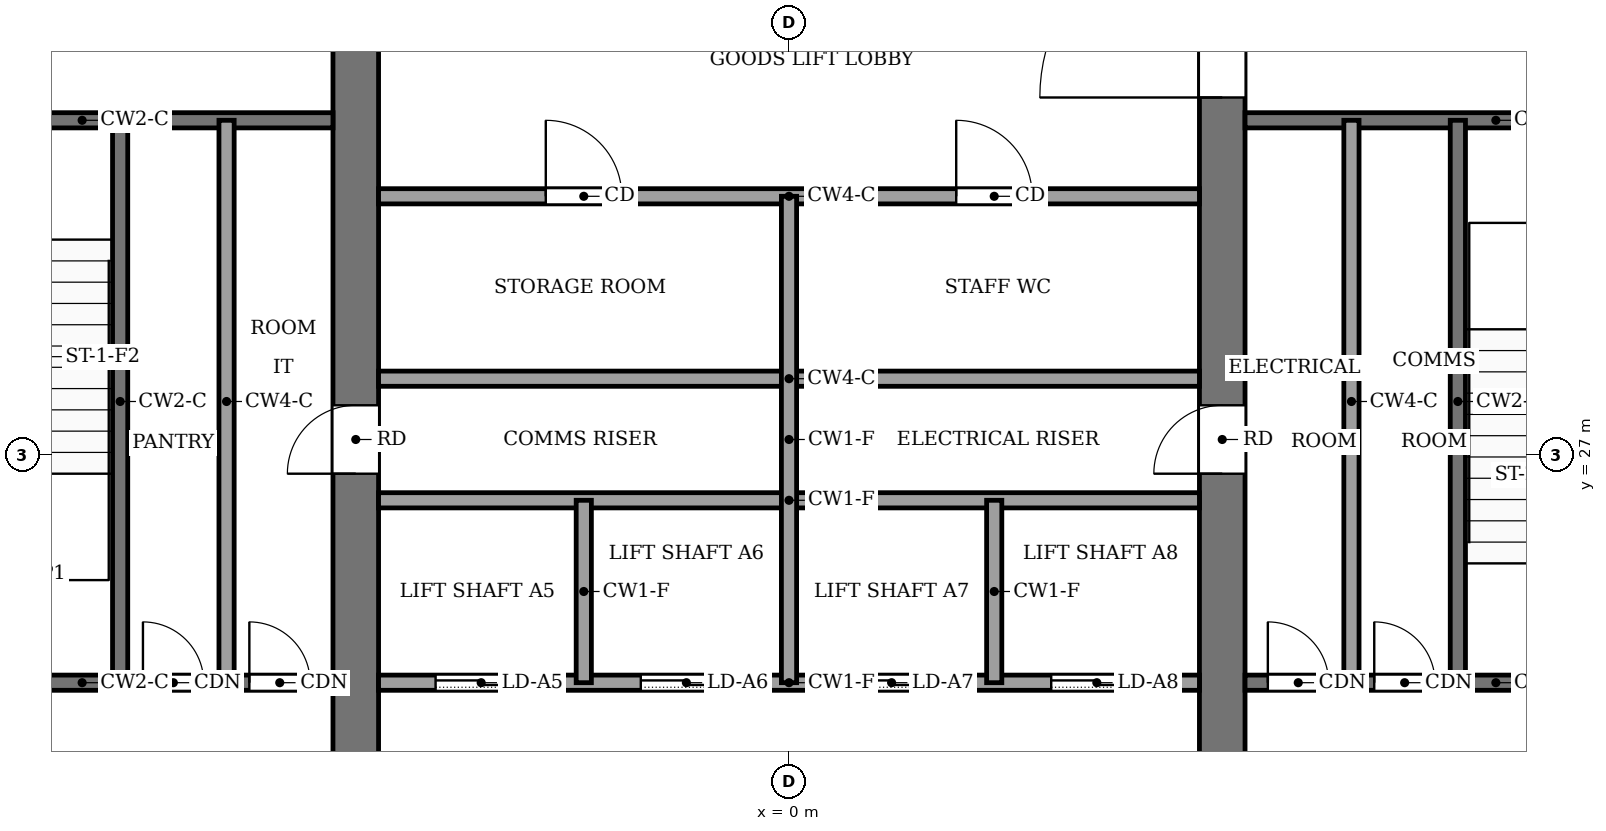
"""IFC4 building model, lengths in metres.
Left out: names, types, materials, properties, quantities, classifications, styles, units other than length and angle.
Written with IfcOpenShell. Run it as: python <this file> out.ifc"""

import sys

from ifc_helpers import new_model, si_unit, direction, frame, frame_2d, origin, place, context, subcontext, project, spatial, rectangle, extrude, element, fill, save


model = new_model("IFC4")
c1 = context("Model", 3, precision=1e-05, world=origin(), true_north=direction((0.0, 1.0)))
c2 = subcontext(c1, "Body", "Model", "MODEL_VIEW")
j1 = project(units=[si_unit("LENGTHUNIT", "METRE"), si_unit("PLANEANGLEUNIT", "RADIAN")], contexts=[c1])
p1 = place(None, origin())
s1 = spatial("IfcSite", under=j1, at=p1, CompositionType="ELEMENT")
p2 = place(p1, origin())
s2 = spatial("IfcBuilding", under=s1, at=p2, CompositionType="ELEMENT")
p3 = place(p2, frame((0.0, 0.0, 218.0)))
s3 = spatial("IfcBuildingStorey", under=s2, at=p3, CompositionType="ELEMENT", Elevation=218.0)
p4 = place(p3, frame((-5.7, 18.4, -0.13), z_axis=(0.0, 0.0, 1.0), x_axis=(0.0, 1.0, 0.0)))
e1 = element("IfcWall", 1, at=p4, inside=s3, PredefinedType="SHEAR", context=c2, shape_type="SweptSolid", body=[
    extrude(rectangle(XDim=19.2, YDim=0.6, at=frame_2d((9.6, 0.0))), origin(), (0.0, 0.0, 1.0), 4.0),
])
p5 = place(p4, frame((8.35, 0.0, 0.13)))
e2 = element("IfcOpeningElement", 2, at=p5, cuts=e1, PredefinedType="OPENING", context=c2, shape_type="SweptSolid", body=[
    extrude(rectangle(XDim=0.9, YDim=2.1, at=frame_2d((0.45, 1.05))), frame((0.0, 0.31, 0.0), z_axis=(0.0, -1.0, 0.0), x_axis=(1.0, 0.0, 0.0)), (0.0, 0.0, 1.0), 0.62),
])
p6 = place(p3, frame((5.7, 18.4, -0.13), z_axis=(0.0, 0.0, 1.0), x_axis=(0.0, 1.0, 0.0)))
e3 = element("IfcWall", 3, at=p6, inside=s3, PredefinedType="SHEAR", context=c2, shape_type="SweptSolid", body=[
    extrude(rectangle(XDim=19.2, YDim=0.6, at=frame_2d((9.6, 0.0))), origin(), (0.0, 0.0, 1.0), 4.0),
])
p7 = place(p6, frame((8.35, 0.0, 0.13)))
e4 = element("IfcOpeningElement", 4, at=p7, cuts=e3, PredefinedType="OPENING", context=c2, shape_type="SweptSolid", body=[
    extrude(rectangle(XDim=0.9, YDim=2.1, at=frame_2d((0.45, 1.05))), frame((0.0, 0.31, 0.0), z_axis=(0.0, -1.0, 0.0), x_axis=(1.0, 0.0, 0.0)), (0.0, 0.0, 1.0), 0.62),
])
p8 = place(p6, frame((13.3, 0.0, 0.13)))
e5 = element("IfcOpeningElement", 5, at=p8, cuts=e3, PredefinedType="OPENING", context=c2, shape_type="SweptSolid", body=[
    extrude(rectangle(XDim=2.4, YDim=2.4, at=frame_2d((1.2, 1.2))), frame((0.0, 0.31, 0.0), z_axis=(0.0, -1.0, 0.0), x_axis=(1.0, 0.0, 0.0)), (0.0, 0.0, 1.0), 0.62),
])
p9 = place(p3, frame((-12.6, 24.0, 0.0), z_axis=(0.0, 0.0, 1.0), x_axis=(1.0, 0.0, 0.0)))
e6 = element("IfcWall", 6, at=p9, inside=s3, PredefinedType="PARTITIONING", context=c2, shape_type="SweptSolid", body=[
    extrude(rectangle(XDim=6.6, YDim=0.2, at=frame_2d((3.3, 0.0))), origin(), (0.0, 0.0, 1.0), 3.87),
])
p10 = place(p9, frame((4.1, 0.0, 0.0)))
e7 = element("IfcOpeningElement", 7, at=p10, cuts=e6, PredefinedType="OPENING", context=c2, shape_type="SweptSolid", body=[
    extrude(rectangle(XDim=0.8, YDim=2.1, at=frame_2d((0.4, 1.05))), frame((0.0, 0.11, 0.0), z_axis=(0.0, -1.0, 0.0), x_axis=(1.0, 0.0, 0.0)), (0.0, 0.0, 1.0), 0.22),
])
p11 = place(p9, frame((5.5, 0.0, 0.0)))
e8 = element("IfcOpeningElement", 8, at=p11, cuts=e6, PredefinedType="OPENING", context=c2, shape_type="SweptSolid", body=[
    extrude(rectangle(XDim=0.8, YDim=2.1, at=frame_2d((0.4, 1.05))), frame((0.0, 0.11, 0.0), z_axis=(0.0, -1.0, 0.0), x_axis=(1.0, 0.0, 0.0)), (0.0, 0.0, 1.0), 0.22),
])
p12 = place(p3, frame((-5.4, 24.0, 0.0), z_axis=(0.0, 0.0, 1.0), x_axis=(1.0, 0.0, 0.0)))
e9 = element("IfcWall", 9, at=p12, inside=s3, PredefinedType="PARTITIONING", context=c2, shape_type="SweptSolid", body=[
    extrude(rectangle(XDim=10.8, YDim=0.2, at=frame_2d((5.4, 0.0))), origin(), (0.0, 0.0, 1.0), 3.87),
])
p13 = place(p12, frame((0.75, 0.0, 0.0)))
e10 = element("IfcOpeningElement", 10, at=p13, cuts=e9, PredefinedType="OPENING", context=c2, shape_type="SweptSolid", body=[
    extrude(rectangle(XDim=1.2, YDim=2.2, at=frame_2d((0.6, 1.1))), frame((0.0, 0.11, 0.0), z_axis=(0.0, -1.0, 0.0), x_axis=(1.0, 0.0, 0.0)), (0.0, 0.0, 1.0), 0.22),
])
p14 = place(p12, frame((3.45, 0.0, 0.0)))
e11 = element("IfcOpeningElement", 11, at=p14, cuts=e9, PredefinedType="OPENING", context=c2, shape_type="SweptSolid", body=[
    extrude(rectangle(XDim=1.2, YDim=2.2, at=frame_2d((0.6, 1.1))), frame((0.0, 0.11, 0.0), z_axis=(0.0, -1.0, 0.0), x_axis=(1.0, 0.0, 0.0)), (0.0, 0.0, 1.0), 0.22),
])
p15 = place(p12, frame((6.15, 0.0, 0.0)))
e12 = element("IfcOpeningElement", 12, at=p15, cuts=e9, PredefinedType="OPENING", context=c2, shape_type="SweptSolid", body=[
    extrude(rectangle(XDim=1.2, YDim=2.2, at=frame_2d((0.6, 1.1))), frame((0.0, 0.11, 0.0), z_axis=(0.0, -1.0, 0.0), x_axis=(1.0, 0.0, 0.0)), (0.0, 0.0, 1.0), 0.22),
])
p16 = place(p12, frame((8.85, 0.0, 0.0)))
e13 = element("IfcOpeningElement", 13, at=p16, cuts=e9, PredefinedType="OPENING", context=c2, shape_type="SweptSolid", body=[
    extrude(rectangle(XDim=1.2, YDim=2.2, at=frame_2d((0.6, 1.1))), frame((0.0, 0.11, 0.0), z_axis=(0.0, -1.0, 0.0), x_axis=(1.0, 0.0, 0.0)), (0.0, 0.0, 1.0), 0.22),
])
p17 = place(p3, frame((6.0, 24.0, 0.0), z_axis=(0.0, 0.0, 1.0), x_axis=(1.0, 0.0, 0.0)))
e14 = element("IfcWall", 14, at=p17, inside=s3, PredefinedType="PARTITIONING", context=c2, shape_type="SweptSolid", body=[
    extrude(rectangle(XDim=6.6, YDim=0.2, at=frame_2d((3.3, 0.0))), origin(), (0.0, 0.0, 1.0), 3.87),
])
p18 = place(p17, frame((0.3, 0.0, 0.0)))
e15 = element("IfcOpeningElement", 15, at=p18, cuts=e14, PredefinedType="OPENING", context=c2, shape_type="SweptSolid", body=[
    extrude(rectangle(XDim=0.8, YDim=2.1, at=frame_2d((0.4, 1.05))), frame((0.0, 0.11, 0.0), z_axis=(0.0, -1.0, 0.0), x_axis=(1.0, 0.0, 0.0)), (0.0, 0.0, 1.0), 0.22),
])
p19 = place(p17, frame((1.7, 0.0, 0.0)))
e16 = element("IfcOpeningElement", 16, at=p19, cuts=e14, PredefinedType="OPENING", context=c2, shape_type="SweptSolid", body=[
    extrude(rectangle(XDim=0.8, YDim=2.1, at=frame_2d((0.4, 1.05))), frame((0.0, 0.11, 0.0), z_axis=(0.0, -1.0, 0.0), x_axis=(1.0, 0.0, 0.0)), (0.0, 0.0, 1.0), 0.22),
])
p20 = place(p17, frame((4.4, 0.0, 0.0)))
e17 = element("IfcOpeningElement", 17, at=p20, cuts=e14, PredefinedType="OPENING", context=c2, shape_type="SweptSolid", body=[
    extrude(rectangle(XDim=1.2, YDim=2.2, at=frame_2d((0.6, 1.1))), frame((0.0, 0.11, 0.0), z_axis=(0.0, -1.0, 0.0), x_axis=(1.0, 0.0, 0.0)), (0.0, 0.0, 1.0), 0.22),
])
for number, where, z_axis, x_axis in (
    (18, (-5.4, 26.4, 0.0), (0.0, 0.0, 1.0), (1.0, 0.0, 0.0)),
    (19, (-5.4, 28.0, 0.0), (0.0, 0.0, 1.0), (1.0, 0.0, 0.0)),
):
    element("IfcWall", number, at=place(p3, frame(where, z_axis=z_axis, x_axis=x_axis)), inside=s3, PredefinedType="PARTITIONING", context=c2, shape_type="SweptSolid", body=[
        extrude(rectangle(XDim=10.8, YDim=0.2, at=frame_2d((5.4, 0.0))), origin(), (0.0, 0.0, 1.0), 3.87),
    ])
p21 = place(p3, frame((-5.4, 30.4, 0.0), z_axis=(0.0, 0.0, 1.0), x_axis=(1.0, 0.0, 0.0)))
e20 = element("IfcWall", 20, at=p21, inside=s3, PredefinedType="PARTITIONING", context=c2, shape_type="SweptSolid", body=[
    extrude(rectangle(XDim=10.8, YDim=0.2, at=frame_2d((5.4, 0.0))), origin(), (0.0, 0.0, 1.0), 3.87),
])
p22 = place(p21, frame((2.2, 0.0, 0.0)))
e21 = element("IfcOpeningElement", 21, at=p22, cuts=e20, PredefinedType="OPENING", context=c2, shape_type="SweptSolid", body=[
    extrude(rectangle(XDim=1.0, YDim=2.1, at=frame_2d((0.5, 1.05))), frame((0.0, 0.11, 0.0), z_axis=(0.0, -1.0, 0.0), x_axis=(1.0, 0.0, 0.0)), (0.0, 0.0, 1.0), 0.22),
])
p23 = place(p21, frame((7.6, 0.0, 0.0)))
e22 = element("IfcOpeningElement", 22, at=p23, cuts=e20, PredefinedType="OPENING", context=c2, shape_type="SweptSolid", body=[
    extrude(rectangle(XDim=1.0, YDim=2.1, at=frame_2d((0.5, 1.05))), frame((0.0, 0.11, 0.0), z_axis=(0.0, -1.0, 0.0), x_axis=(1.0, 0.0, 0.0)), (0.0, 0.0, 1.0), 0.22),
])
p24 = place(p3, frame((-12.6, 31.4, 0.0), z_axis=(0.0, 0.0, 1.0), x_axis=(1.0, 0.0, 0.0)))
e23 = element("IfcWall", 23, at=p24, inside=s3, PredefinedType="PARTITIONING", context=c2, shape_type="SweptSolid", body=[
    extrude(rectangle(XDim=6.6, YDim=0.2, at=frame_2d((3.3, 0.0))), origin(), (0.0, 0.0, 1.0), 3.87),
])
p25 = place(p24, frame((1.0, 0.0, 0.0)))
e24 = element("IfcOpeningElement", 24, at=p25, cuts=e23, PredefinedType="OPENING", context=c2, shape_type="SweptSolid", body=[
    extrude(rectangle(XDim=1.2, YDim=2.2, at=frame_2d((0.6, 1.1))), frame((0.0, 0.11, 0.0), z_axis=(0.0, -1.0, 0.0), x_axis=(1.0, 0.0, 0.0)), (0.0, 0.0, 1.0), 0.22),
])
p26 = place(p3, frame((6.0, 31.4, 0.0), z_axis=(0.0, 0.0, 1.0), x_axis=(1.0, 0.0, 0.0)))
e25 = element("IfcWall", 25, at=p26, inside=s3, PredefinedType="PARTITIONING", context=c2, shape_type="SweptSolid", body=[
    extrude(rectangle(XDim=6.6, YDim=0.2, at=frame_2d((3.3, 0.0))), origin(), (0.0, 0.0, 1.0), 3.87),
])
for number, where, z_axis, x_axis in (
    (26, (-8.8, 24.0, 0.0), (0.0, 0.0, 1.0), (0.0, 1.0, 0.0)),
    (27, (-7.4, 24.0, 0.0), (0.0, 0.0, 1.0), (0.0, 1.0, 0.0)),
):
    element("IfcWall", number, at=place(p3, frame(where, z_axis=z_axis, x_axis=x_axis)), inside=s3, PredefinedType="PARTITIONING", context=c2, shape_type="SweptSolid", body=[
        extrude(rectangle(XDim=7.4, YDim=0.2, at=frame_2d((3.7, 0.0))), origin(), (0.0, 0.0, 1.0), 3.87),
    ])
p27 = place(p3, frame((-2.7, 24.0, 0.0), z_axis=(0.0, 0.0, 1.0), x_axis=(0.0, 1.0, 0.0)))
e28 = element("IfcWall", 28, at=p27, inside=s3, PredefinedType="PARTITIONING", context=c2, shape_type="SweptSolid", body=[
    extrude(rectangle(XDim=2.4, YDim=0.2, at=frame_2d((1.2, 0.0))), origin(), (0.0, 0.0, 1.0), 3.87),
])
p28 = place(p3, frame((0.0, 24.0, 0.0), z_axis=(0.0, 0.0, 1.0), x_axis=(0.0, 1.0, 0.0)))
e29 = element("IfcWall", 29, at=p28, inside=s3, PredefinedType="PARTITIONING", context=c2, shape_type="SweptSolid", body=[
    extrude(rectangle(XDim=6.4, YDim=0.2, at=frame_2d((3.2, 0.0))), origin(), (0.0, 0.0, 1.0), 3.87),
])
p29 = place(p3, frame((2.7, 24.0, 0.0), z_axis=(0.0, 0.0, 1.0), x_axis=(0.0, 1.0, 0.0)))
e30 = element("IfcWall", 30, at=p29, inside=s3, PredefinedType="PARTITIONING", context=c2, shape_type="SweptSolid", body=[
    extrude(rectangle(XDim=2.4, YDim=0.2, at=frame_2d((1.2, 0.0))), origin(), (0.0, 0.0, 1.0), 3.87),
])
for number, where, z_axis, x_axis in (
    (31, (7.4, 24.0, 0.0), (0.0, 0.0, 1.0), (0.0, 1.0, 0.0)),
    (32, (8.8, 24.0, 0.0), (0.0, 0.0, 1.0), (0.0, 1.0, 0.0)),
):
    element("IfcWall", number, at=place(p3, frame(where, z_axis=z_axis, x_axis=x_axis)), inside=s3, PredefinedType="PARTITIONING", context=c2, shape_type="SweptSolid", body=[
        extrude(rectangle(XDim=7.4, YDim=0.2, at=frame_2d((3.7, 0.0))), origin(), (0.0, 0.0, 1.0), 3.87),
    ])
p30 = place(p13, origin())
e33 = element("IfcDoor", 33, at=p30, inside=s3, OperationType="SLIDING_TO_LEFT", PredefinedType="DOOR", context=c2, shape_type="SweptSolid", body=[
    extrude(rectangle(XDim=1.2, YDim=2.2, at=frame_2d((0.6, 1.1))), frame((0.0, 0.025, 0.0), z_axis=(0.0, -1.0, 0.0), x_axis=(1.0, 0.0, 0.0)), (0.0, 0.0, 1.0), 0.05),
])
fill(e10, e33)
p31 = place(p14, origin())
e34 = element("IfcDoor", 34, at=p31, inside=s3, OperationType="SLIDING_TO_LEFT", PredefinedType="DOOR", context=c2, shape_type="SweptSolid", body=[
    extrude(rectangle(XDim=1.2, YDim=2.2, at=frame_2d((0.6, 1.1))), frame((0.0, 0.025, 0.0), z_axis=(0.0, -1.0, 0.0), x_axis=(1.0, 0.0, 0.0)), (0.0, 0.0, 1.0), 0.05),
])
fill(e11, e34)
p32 = place(p15, origin())
e35 = element("IfcDoor", 35, at=p32, inside=s3, OperationType="SLIDING_TO_LEFT", PredefinedType="DOOR", context=c2, shape_type="SweptSolid", body=[
    extrude(rectangle(XDim=1.2, YDim=2.2, at=frame_2d((0.6, 1.1))), frame((0.0, 0.025, 0.0), z_axis=(0.0, -1.0, 0.0), x_axis=(1.0, 0.0, 0.0)), (0.0, 0.0, 1.0), 0.05),
])
fill(e12, e35)
p33 = place(p16, origin())
e36 = element("IfcDoor", 36, at=p33, inside=s3, OperationType="SLIDING_TO_LEFT", PredefinedType="DOOR", context=c2, shape_type="SweptSolid", body=[
    extrude(rectangle(XDim=1.2, YDim=2.2, at=frame_2d((0.6, 1.1))), frame((0.0, 0.025, 0.0), z_axis=(0.0, -1.0, 0.0), x_axis=(1.0, 0.0, 0.0)), (0.0, 0.0, 1.0), 0.05),
])
fill(e13, e36)
p34 = place(p22, origin())
e37 = element("IfcDoor", 37, at=p34, inside=s3, OperationType="SINGLE_SWING_LEFT", PredefinedType="DOOR", context=c2, shape_type="SweptSolid", body=[
    extrude(rectangle(XDim=1.0, YDim=2.1, at=frame_2d((0.5, 1.05))), frame((0.0, 0.025, 0.0), z_axis=(0.0, -1.0, 0.0), x_axis=(1.0, 0.0, 0.0)), (0.0, 0.0, 1.0), 0.05),
])
fill(e21, e37)
p35 = place(p23, origin())
e38 = element("IfcDoor", 38, at=p35, inside=s3, OperationType="SINGLE_SWING_RIGHT", PredefinedType="DOOR", context=c2, shape_type="SweptSolid", body=[
    extrude(rectangle(XDim=1.0, YDim=2.1, at=frame_2d((0.5, 1.05))), frame((0.0, 0.025, 0.0), z_axis=(0.0, -1.0, 0.0), x_axis=(1.0, 0.0, 0.0)), (0.0, 0.0, 1.0), 0.05),
])
fill(e22, e38)
p36 = place(p10, origin())
e39 = element("IfcDoor", 39, at=p36, inside=s3, OperationType="SINGLE_SWING_RIGHT", PredefinedType="DOOR", context=c2, shape_type="SweptSolid", body=[
    extrude(rectangle(XDim=0.8, YDim=2.1, at=frame_2d((0.4, 1.05))), frame((0.0, 0.025, 0.0), z_axis=(0.0, -1.0, 0.0), x_axis=(1.0, 0.0, 0.0)), (0.0, 0.0, 1.0), 0.05),
])
fill(e7, e39)
p37 = place(p11, origin())
e40 = element("IfcDoor", 40, at=p37, inside=s3, OperationType="SINGLE_SWING_LEFT", PredefinedType="DOOR", context=c2, shape_type="SweptSolid", body=[
    extrude(rectangle(XDim=0.8, YDim=2.1, at=frame_2d((0.4, 1.05))), frame((0.0, 0.025, 0.0), z_axis=(0.0, -1.0, 0.0), x_axis=(1.0, 0.0, 0.0)), (0.0, 0.0, 1.0), 0.05),
])
fill(e8, e40)
p38 = place(p18, origin())
e41 = element("IfcDoor", 41, at=p38, inside=s3, OperationType="SINGLE_SWING_RIGHT", PredefinedType="DOOR", context=c2, shape_type="SweptSolid", body=[
    extrude(rectangle(XDim=0.8, YDim=2.1, at=frame_2d((0.4, 1.05))), frame((0.0, 0.025, 0.0), z_axis=(0.0, -1.0, 0.0), x_axis=(1.0, 0.0, 0.0)), (0.0, 0.0, 1.0), 0.05),
])
fill(e15, e41)
p39 = place(p19, origin())
e42 = element("IfcDoor", 42, at=p39, inside=s3, OperationType="SINGLE_SWING_LEFT", PredefinedType="DOOR", context=c2, shape_type="SweptSolid", body=[
    extrude(rectangle(XDim=0.8, YDim=2.1, at=frame_2d((0.4, 1.05))), frame((0.0, 0.025, 0.0), z_axis=(0.0, -1.0, 0.0), x_axis=(1.0, 0.0, 0.0)), (0.0, 0.0, 1.0), 0.05),
])
fill(e16, e42)
p40 = place(p5, origin())
e43 = element("IfcDoor", 43, at=p40, inside=s3, OperationType="SINGLE_SWING_LEFT", PredefinedType="DOOR", context=c2, shape_type="SweptSolid", body=[
    extrude(rectangle(XDim=0.9, YDim=2.1, at=frame_2d((0.45, 1.05))), frame((0.0, 0.025, 0.0), z_axis=(0.0, -1.0, 0.0), x_axis=(1.0, 0.0, 0.0)), (0.0, 0.0, 1.0), 0.05),
])
fill(e2, e43)
p41 = place(p7, origin())
e44 = element("IfcDoor", 44, at=p41, inside=s3, OperationType="SINGLE_SWING_RIGHT", PredefinedType="DOOR", context=c2, shape_type="SweptSolid", body=[
    extrude(rectangle(XDim=0.9, YDim=2.1, at=frame_2d((0.45, 1.05))), frame((0.0, 0.025, 0.0), z_axis=(0.0, -1.0, 0.0), x_axis=(1.0, 0.0, 0.0)), (0.0, 0.0, 1.0), 0.05),
])
fill(e4, e44)
p42 = place(p8, origin())
e45 = element("IfcDoor", 45, at=p42, inside=s3, OperationType="DOUBLE_DOOR_SINGLE_SWING", PredefinedType="DOOR", context=c2, shape_type="SweptSolid", body=[
    extrude(rectangle(XDim=2.4, YDim=2.4, at=frame_2d((1.2, 1.2))), frame((0.0, 0.025, 0.0), z_axis=(0.0, -1.0, 0.0), x_axis=(1.0, 0.0, 0.0)), (0.0, 0.0, 1.0), 0.05),
])
fill(e5, e45)
save(model, sys.argv[1])
